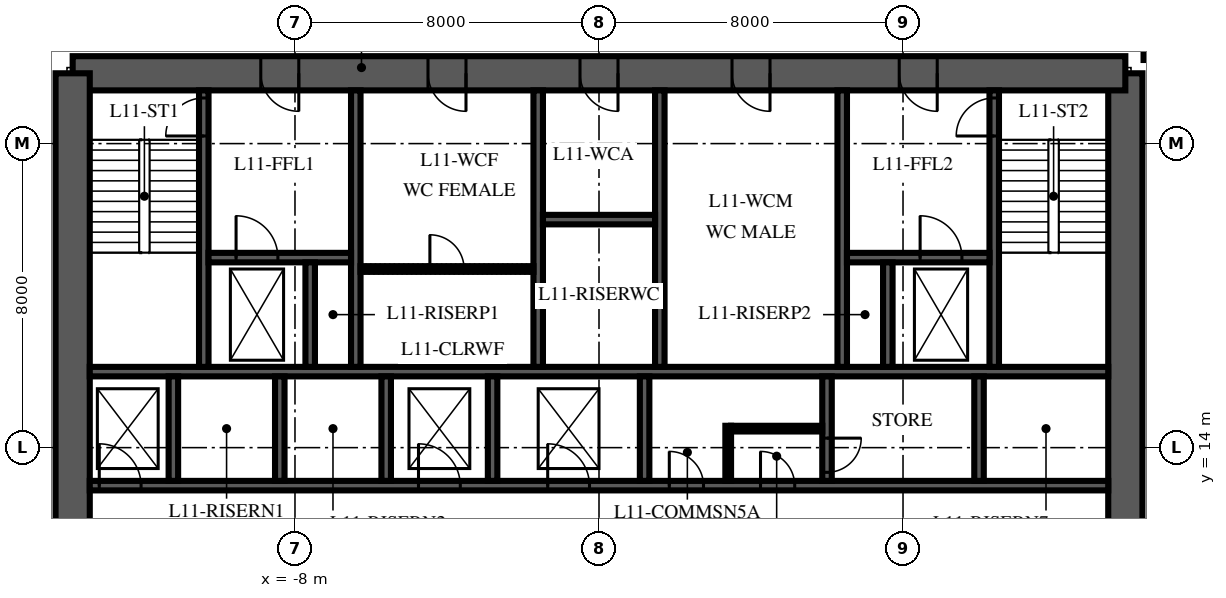
"""IFC4 building model, lengths in metres.
Left out: names, types, materials, properties, quantities, classifications, styles, units other than length and angle.
Written with IfcOpenShell. Run it as: python <this file> out.ifc"""

import sys

from ifc_helpers import new_model, si_unit, direction, frame, frame_2d, origin, place, context, subcontext, project, spatial, polyline, rectangle, outline, extrude, element, fill, save


model = new_model("IFC4")
c1 = context("Model", 3, precision=1e-05, world=origin(), true_north=direction((0.0, 1.0)))
c2 = subcontext(c1, "Body", "Model", "MODEL_VIEW")
j1 = project(units=[si_unit("LENGTHUNIT", "METRE"), si_unit("PLANEANGLEUNIT", "RADIAN")], contexts=[c1])
p1 = place(None, origin())
s1 = spatial("IfcSite", under=j1, at=p1, CompositionType="ELEMENT")
p2 = place(p1, origin())
s2 = spatial("IfcBuilding", under=s1, at=p2, CompositionType="ELEMENT")
p3 = place(p2, frame((0.0, 0.0, 56.0)))
s3 = spatial("IfcBuildingStorey", under=s2, at=p3, CompositionType="ELEMENT", Elevation=56.0)
p4 = place(p3, frame((13.85, 6.15, 0.0), z_axis=(0.0, 0.0, 1.0), x_axis=(0.0, 1.0, 0.0)))
e1 = element("IfcWall", 1, at=p4, inside=s3, PredefinedType="SHEAR", context=c2, shape_type="SweptSolid", body=[
    extrude(outline(polyline([(0.0, -0.45), (17.7, -0.45), (17.7, 0.0), (17.25, 0.0), (17.25, 0.45), (0.45, 0.45), (0.45, 0.0), (0.0, 0.0), (0.0, -0.45)])), origin(), (0.0, 0.0, 1.0), 4.0),
])
p5 = place(p4, frame((4.15, 0.0, 0.0)))
e2 = element("IfcOpeningElement", 2, at=p5, cuts=e1, PredefinedType="OPENING", context=c2, shape_type="SweptSolid", body=[
    extrude(rectangle(XDim=1.8, YDim=2.4, at=frame_2d((0.9, 1.2))), frame((0.0, 0.465, 0.0), z_axis=(0.0, -1.0, 0.0), x_axis=(1.0, 0.0, 0.0)), (0.0, 0.0, 1.0), 0.93),
])
p6 = place(p3, frame((13.85, 23.85, 0.0), z_axis=(0.0, 0.0, 1.0), x_axis=(-1.0, 0.0, 0.0)))
e3 = element("IfcWall", 3, at=p6, inside=s3, PredefinedType="SHEAR", context=c2, shape_type="SweptSolid", body=[
    extrude(rectangle(XDim=27.7, YDim=0.9, at=frame_2d((13.85, 0.0))), origin(), (0.0, 0.0, 1.0), 4.0),
])
p7 = place(p6, frame((21.75, 0.0, 0.0)))
e4 = element("IfcOpeningElement", 4, at=p7, cuts=e3, PredefinedType="OPENING", context=c2, shape_type="SweptSolid", body=[
    extrude(rectangle(XDim=1.0, YDim=2.1, at=frame_2d((0.5, 1.05))), frame((0.0, 0.465, 0.0), z_axis=(0.0, -1.0, 0.0), x_axis=(1.0, 0.0, 0.0)), (0.0, 0.0, 1.0), 0.93),
])
p8 = place(p6, frame((4.95, 0.0, 0.0)))
e5 = element("IfcOpeningElement", 5, at=p8, cuts=e3, PredefinedType="OPENING", context=c2, shape_type="SweptSolid", body=[
    extrude(rectangle(XDim=1.0, YDim=2.1, at=frame_2d((0.5, 1.05))), frame((0.0, 0.465, 0.0), z_axis=(0.0, -1.0, 0.0), x_axis=(1.0, 0.0, 0.0)), (0.0, 0.0, 1.0), 0.93),
])
p9 = place(p6, frame((17.35, 0.0, 0.0)))
e6 = element("IfcOpeningElement", 6, at=p9, cuts=e3, PredefinedType="OPENING", context=c2, shape_type="SweptSolid", body=[
    extrude(rectangle(XDim=1.0, YDim=2.1, at=frame_2d((0.5, 1.05))), frame((0.0, 0.465, 0.0), z_axis=(0.0, -1.0, 0.0), x_axis=(1.0, 0.0, 0.0)), (0.0, 0.0, 1.0), 0.93),
])
p10 = place(p6, frame((13.35, 0.0, 0.0)))
e7 = element("IfcOpeningElement", 7, at=p10, cuts=e3, PredefinedType="OPENING", context=c2, shape_type="SweptSolid", body=[
    extrude(rectangle(XDim=1.0, YDim=2.1, at=frame_2d((0.5, 1.05))), frame((0.0, 0.465, 0.0), z_axis=(0.0, -1.0, 0.0), x_axis=(1.0, 0.0, 0.0)), (0.0, 0.0, 1.0), 0.93),
])
p11 = place(p6, frame((9.35, 0.0, 0.0)))
e8 = element("IfcOpeningElement", 8, at=p11, cuts=e3, PredefinedType="OPENING", context=c2, shape_type="SweptSolid", body=[
    extrude(rectangle(XDim=1.0, YDim=2.1, at=frame_2d((0.5, 1.05))), frame((0.0, 0.465, 0.0), z_axis=(0.0, -1.0, 0.0), x_axis=(1.0, 0.0, 0.0)), (0.0, 0.0, 1.0), 0.93),
])
p12 = place(p3, frame((-13.85, 23.85, 0.0), z_axis=(0.0, 0.0, 1.0), x_axis=(0.0, -1.0, 0.0)))
e9 = element("IfcWall", 9, at=p12, inside=s3, PredefinedType="SHEAR", context=c2, shape_type="SweptSolid", body=[
    extrude(outline(polyline([(0.0, -0.45), (17.7, -0.45), (17.7, 0.0), (17.25, 0.0), (17.25, 0.45), (0.45, 0.45), (0.45, 0.0), (0.0, 0.0), (0.0, -0.45)])), origin(), (0.0, 0.0, 1.0), 4.0),
])
p13 = place(p12, frame((11.75, 0.0, 0.0)))
e10 = element("IfcOpeningElement", 10, at=p13, cuts=e9, PredefinedType="OPENING", context=c2, shape_type="SweptSolid", body=[
    extrude(rectangle(XDim=1.8, YDim=2.4, at=frame_2d((0.9, 1.2))), frame((0.0, 0.465, 0.0), z_axis=(0.0, -1.0, 0.0), x_axis=(1.0, 0.0, 0.0)), (0.0, 0.0, 1.0), 0.93),
])
p14 = place(p3, frame((-13.4, 13.0, 0.0), z_axis=(0.0, 0.0, 1.0), x_axis=(1.0, 0.0, 0.0)))
e11 = element("IfcWall", 11, at=p14, inside=s3, PredefinedType="SHEAR", context=c2, shape_type="SweptSolid", body=[
    extrude(rectangle(XDim=26.8, YDim=0.25, at=frame_2d((13.4, 0.0))), origin(), (0.0, 0.0, 1.0), 4.0),
])
p15 = place(p14, frame((0.25, 0.0, 0.0)))
e12 = element("IfcOpeningElement", 12, at=p15, cuts=e11, PredefinedType="OPENING", context=c2, shape_type="SweptSolid", body=[
    extrude(rectangle(XDim=1.1, YDim=2.1, at=frame_2d((0.55, 1.05))), frame((0.0, 0.14, 0.0), z_axis=(0.0, -1.0, 0.0), x_axis=(1.0, 0.0, 0.0)), (0.0, 0.0, 1.0), 0.28),
])
p16 = place(p14, frame((8.65, 0.0, 0.0)))
e13 = element("IfcOpeningElement", 13, at=p16, cuts=e11, PredefinedType="OPENING", context=c2, shape_type="SweptSolid", body=[
    extrude(rectangle(XDim=1.1, YDim=2.1, at=frame_2d((0.55, 1.05))), frame((0.0, 0.14, 0.0), z_axis=(0.0, -1.0, 0.0), x_axis=(1.0, 0.0, 0.0)), (0.0, 0.0, 1.0), 0.28),
])
p17 = place(p14, frame((12.05, 0.0, 0.0)))
e14 = element("IfcOpeningElement", 14, at=p17, cuts=e11, PredefinedType="OPENING", context=c2, shape_type="SweptSolid", body=[
    extrude(rectangle(XDim=1.1, YDim=2.1, at=frame_2d((0.55, 1.05))), frame((0.0, 0.14, 0.0), z_axis=(0.0, -1.0, 0.0), x_axis=(1.0, 0.0, 0.0)), (0.0, 0.0, 1.0), 0.28),
])
p18 = place(p14, frame((15.25, 0.0, 0.0)))
e15 = element("IfcOpeningElement", 15, at=p18, cuts=e11, PredefinedType="OPENING", context=c2, shape_type="SweptSolid", body=[
    extrude(rectangle(XDim=0.9, YDim=2.1, at=frame_2d((0.45, 1.05))), frame((0.0, 0.14, 0.0), z_axis=(0.0, -1.0, 0.0), x_axis=(1.0, 0.0, 0.0)), (0.0, 0.0, 1.0), 0.28),
])
p19 = place(p14, frame((17.65, 0.0, 0.0)))
e16 = element("IfcOpeningElement", 16, at=p19, cuts=e11, PredefinedType="OPENING", context=c2, shape_type="SweptSolid", body=[
    extrude(rectangle(XDim=0.9, YDim=2.1, at=frame_2d((0.45, 1.05))), frame((0.0, 0.14, 0.0), z_axis=(0.0, -1.0, 0.0), x_axis=(1.0, 0.0, 0.0)), (0.0, 0.0, 1.0), 0.28),
])
p20 = place(p3, frame((-13.4, 16.0, 0.0), z_axis=(0.0, 0.0, 1.0), x_axis=(1.0, 0.0, 0.0)))
e17 = element("IfcWall", 17, at=p20, inside=s3, PredefinedType="SHEAR", context=c2, shape_type="SweptSolid", body=[
    extrude(rectangle(XDim=26.8, YDim=0.25, at=frame_2d((13.4, 0.0))), origin(), (0.0, 0.0, 1.0), 4.0),
])
for number, where, z_axis, x_axis in (
    (18, (-11.2, 13.125, 0.0), (0.0, 0.0, 1.0), (0.0, 1.0, 0.0)),
    (19, (-8.4, 13.125, 0.0), (0.0, 0.0, 1.0), (0.0, 1.0, 0.0)),
    (20, (-5.6, 13.125, 0.0), (0.0, 0.0, 1.0), (0.0, 1.0, 0.0)),
    (21, (-2.8, 13.125, 0.0), (0.0, 0.0, 1.0), (0.0, 1.0, 0.0)),
    (22, (1.2, 13.125, 0.0), (0.0, 0.0, 1.0), (0.0, 1.0, 0.0)),
):
    element("IfcWall", number, at=place(p3, frame(where, z_axis=z_axis, x_axis=x_axis)), inside=s3, PredefinedType="SHEAR", context=c2, shape_type="SweptSolid", body=[
        extrude(rectangle(XDim=2.75, YDim=0.25, at=frame_2d((1.375, 0.0))), origin(), (0.0, 0.0, 1.0), 4.0),
    ])
p21 = place(p3, frame((6.0, 13.125, 0.0), z_axis=(0.0, 0.0, 1.0), x_axis=(0.0, 1.0, 0.0)))
e23 = element("IfcWall", 23, at=p21, inside=s3, PredefinedType="SHEAR", context=c2, shape_type="SweptSolid", body=[
    extrude(rectangle(XDim=2.75, YDim=0.25, at=frame_2d((1.375, 0.0))), origin(), (0.0, 0.0, 1.0), 4.0),
])
p22 = place(p21, frame((0.225, 0.0, 0.0)))
e24 = element("IfcOpeningElement", 24, at=p22, cuts=e23, PredefinedType="OPENING", context=c2, shape_type="SweptSolid", body=[
    extrude(rectangle(XDim=0.9, YDim=2.1, at=frame_2d((0.45, 1.05))), frame((0.0, 0.14, 0.0), z_axis=(0.0, -1.0, 0.0), x_axis=(1.0, 0.0, 0.0)), (0.0, 0.0, 1.0), 0.28),
])
p23 = place(p3, frame((10.0, 13.125, 0.0), z_axis=(0.0, 0.0, 1.0), x_axis=(0.0, 1.0, 0.0)))
e25 = element("IfcWall", 25, at=p23, inside=s3, PredefinedType="SHEAR", context=c2, shape_type="SweptSolid", body=[
    extrude(rectangle(XDim=2.75, YDim=0.25, at=frame_2d((1.375, 0.0))), origin(), (0.0, 0.0, 1.0), 4.0),
])
p24 = place(p3, frame((-10.4, 16.125, 0.0), z_axis=(0.0, 0.0, 1.0), x_axis=(0.0, 1.0, 0.0)))
e26 = element("IfcWall", 26, at=p24, inside=s3, PredefinedType="SHEAR", context=c2, shape_type="SweptSolid", body=[
    extrude(rectangle(XDim=7.275, YDim=0.25, at=frame_2d((3.637, 0.0))), origin(), (0.0, 0.0, 1.0), 4.0),
])
p25 = place(p24, frame((6.075, 0.0, 0.0)))
e27 = element("IfcOpeningElement", 27, at=p25, cuts=e26, PredefinedType="OPENING", context=c2, shape_type="SweptSolid", body=[
    extrude(rectangle(XDim=1.0, YDim=2.1, at=frame_2d((0.5, 1.05))), frame((0.0, 0.14, 0.0), z_axis=(0.0, -1.0, 0.0), x_axis=(1.0, 0.0, 0.0)), (0.0, 0.0, 1.0), 0.28),
])
for number, where, z_axis, x_axis in (
    (28, (-6.4, 16.125, 0.0), (0.0, 0.0, 1.0), (0.0, 1.0, 0.0)),
    (29, (-1.6, 16.125, 0.0), (0.0, 0.0, 1.0), (0.0, 1.0, 0.0)),
    (30, (1.6, 16.125, 0.0), (0.0, 0.0, 1.0), (0.0, 1.0, 0.0)),
    (31, (6.4, 16.125, 0.0), (0.0, 0.0, 1.0), (0.0, 1.0, 0.0)),
):
    element("IfcWall", number, at=place(p3, frame(where, z_axis=z_axis, x_axis=x_axis)), inside=s3, PredefinedType="SHEAR", context=c2, shape_type="SweptSolid", body=[
        extrude(rectangle(XDim=7.275, YDim=0.25, at=frame_2d((3.637, 0.0))), origin(), (0.0, 0.0, 1.0), 4.0),
    ])
p26 = place(p3, frame((10.4, 16.125, 0.0), z_axis=(0.0, 0.0, 1.0), x_axis=(0.0, 1.0, 0.0)))
e32 = element("IfcWall", 32, at=p26, inside=s3, PredefinedType="SHEAR", context=c2, shape_type="SweptSolid", body=[
    extrude(rectangle(XDim=7.275, YDim=0.25, at=frame_2d((3.637, 0.0))), origin(), (0.0, 0.0, 1.0), 4.0),
])
p27 = place(p26, frame((6.075, 0.0, 0.0)))
e33 = element("IfcOpeningElement", 33, at=p27, cuts=e32, PredefinedType="OPENING", context=c2, shape_type="SweptSolid", body=[
    extrude(rectangle(XDim=1.0, YDim=2.1, at=frame_2d((0.5, 1.05))), frame((0.0, 0.14, 0.0), z_axis=(0.0, -1.0, 0.0), x_axis=(1.0, 0.0, 0.0)), (0.0, 0.0, 1.0), 0.28),
])
p28 = place(p3, frame((-10.275, 19.0, 0.0), z_axis=(0.0, 0.0, 1.0), x_axis=(1.0, 0.0, 0.0)))
e34 = element("IfcWall", 34, at=p28, inside=s3, PredefinedType="SHEAR", context=c2, shape_type="SweptSolid", body=[
    extrude(rectangle(XDim=3.75, YDim=0.25, at=frame_2d((1.875, 0.0))), origin(), (0.0, 0.0, 1.0), 4.0),
])
p29 = place(p28, frame((0.725, 0.0, 0.0)))
e35 = element("IfcOpeningElement", 35, at=p29, cuts=e34, PredefinedType="OPENING", context=c2, shape_type="SweptSolid", body=[
    extrude(rectangle(XDim=1.1, YDim=2.1, at=frame_2d((0.55, 1.05))), frame((0.0, 0.14, 0.0), z_axis=(0.0, -1.0, 0.0), x_axis=(1.0, 0.0, 0.0)), (0.0, 0.0, 1.0), 0.28),
])
p30 = place(p3, frame((6.525, 19.0, 0.0), z_axis=(0.0, 0.0, 1.0), x_axis=(1.0, 0.0, 0.0)))
e36 = element("IfcWall", 36, at=p30, inside=s3, PredefinedType="SHEAR", context=c2, shape_type="SweptSolid", body=[
    extrude(rectangle(XDim=3.75, YDim=0.25, at=frame_2d((1.875, 0.0))), origin(), (0.0, 0.0, 1.0), 4.0),
])
p31 = place(p30, frame((1.925, 0.0, 0.0)))
e37 = element("IfcOpeningElement", 37, at=p31, cuts=e36, PredefinedType="OPENING", context=c2, shape_type="SweptSolid", body=[
    extrude(rectangle(XDim=1.1, YDim=2.1, at=frame_2d((0.55, 1.05))), frame((0.0, 0.14, 0.0), z_axis=(0.0, -1.0, 0.0), x_axis=(1.0, 0.0, 0.0)), (0.0, 0.0, 1.0), 0.28),
])
for number, where, z_axis, x_axis in (
    (38, (-7.6, 16.125, 0.0), (0.0, 0.0, 1.0), (0.0, 1.0, 0.0)),
    (39, (7.6, 16.125, 0.0), (0.0, 0.0, 1.0), (0.0, 1.0, 0.0)),
):
    element("IfcWall", number, at=place(p3, frame(where, z_axis=z_axis, x_axis=x_axis)), inside=s3, PredefinedType="SHEAR", context=c2, shape_type="SweptSolid", body=[
        extrude(rectangle(XDim=2.75, YDim=0.25, at=frame_2d((1.375, 0.0))), origin(), (0.0, 0.0, 1.0), 4.0),
    ])
p32 = place(p3, frame((-1.475, 20.0, 0.0), z_axis=(0.0, 0.0, 1.0), x_axis=(1.0, 0.0, 0.0)))
e40 = element("IfcWall", 40, at=p32, inside=s3, PredefinedType="SHEAR", context=c2, shape_type="SweptSolid", body=[
    extrude(rectangle(XDim=2.95, YDim=0.25, at=frame_2d((1.475, 0.0))), origin(), (0.0, 0.0, 1.0), 4.0),
])
p33 = place(p3, frame((-6.275, 18.7, 0.0), z_axis=(0.0, 0.0, 1.0), x_axis=(1.0, 0.0, 0.0)))
e41 = element("IfcWall", 41, at=p33, inside=s3, PredefinedType="PARTITIONING", context=c2, shape_type="SweptSolid", body=[
    extrude(rectangle(XDim=4.55, YDim=0.15, at=frame_2d((2.275, 0.0))), origin(), (0.0, 0.0, 1.0), 3.85),
])
p34 = place(p33, frame((1.825, 0.0, 0.0)))
e42 = element("IfcOpeningElement", 42, at=p34, cuts=e41, PredefinedType="OPENING", context=c2, shape_type="SweptSolid", body=[
    extrude(rectangle(XDim=0.9, YDim=2.1, at=frame_2d((0.45, 1.05))), frame((0.0, 0.09, 0.0), z_axis=(0.0, -1.0, 0.0), x_axis=(1.0, 0.0, 0.0)), (0.0, 0.0, 1.0), 0.18),
])
p35 = place(p3, frame((3.4, 13.125, 0.0), z_axis=(0.0, 0.0, 1.0), x_axis=(0.0, 1.0, 0.0)))
e43 = element("IfcWall", 43, at=p35, inside=s3, PredefinedType="PARTITIONING", context=c2, shape_type="SweptSolid", body=[
    extrude(rectangle(XDim=1.45, YDim=0.15, at=frame_2d((0.725, 0.0))), origin(), (0.0, 0.0, 1.0), 3.85),
])
p36 = place(p3, frame((3.475, 14.5, 0.0), z_axis=(0.0, 0.0, 1.0), x_axis=(1.0, 0.0, 0.0)))
e44 = element("IfcWall", 44, at=p36, inside=s3, PredefinedType="PARTITIONING", context=c2, shape_type="SweptSolid", body=[
    extrude(rectangle(XDim=2.4, YDim=0.15, at=frame_2d((1.2, 0.0))), origin(), (0.0, 0.0, 1.0), 3.85),
])
p37 = place(p3, frame((14.33, 24.3, 0.0), z_axis=(0.0, 0.0, 1.0), x_axis=(1.0, 0.0, 0.0)))
e45 = element("IfcWall", 45, at=p37, inside=s3, PredefinedType="PARTITIONING", context=c2, shape_type="SweptSolid", body=[
    extrude(rectangle(XDim=1.82, YDim=0.2, at=frame_2d((0.91, 0.0))), origin(), (0.0, 0.0, 1.0), 3.4),
])
p38 = place(p7, origin())
e46 = element("IfcDoor", 46, at=p38, inside=s3, OperationType="SINGLE_SWING_RIGHT", PredefinedType="DOOR", context=c2, shape_type="SweptSolid", body=[
    extrude(rectangle(XDim=1.0, YDim=2.1, at=frame_2d((0.5, 1.05))), frame((0.0, 0.45, 0.0), z_axis=(0.0, -1.0, 0.0), x_axis=(1.0, 0.0, 0.0)), (0.0, 0.0, 1.0), 0.899),
])
fill(e4, e46)
p39 = place(p8, origin())
e47 = element("IfcDoor", 47, at=p39, inside=s3, OperationType="SINGLE_SWING_RIGHT", PredefinedType="DOOR", context=c2, shape_type="SweptSolid", body=[
    extrude(rectangle(XDim=1.0, YDim=2.1, at=frame_2d((0.5, 1.05))), frame((0.0, 0.45, 0.0), z_axis=(0.0, -1.0, 0.0), x_axis=(1.0, 0.0, 0.0)), (0.0, 0.0, 1.0), 0.899),
])
fill(e5, e47)
p40 = place(p9, origin())
e48 = element("IfcDoor", 48, at=p40, inside=s3, OperationType="SINGLE_SWING_LEFT", PredefinedType="DOOR", context=c2, shape_type="SweptSolid", body=[
    extrude(rectangle(XDim=1.0, YDim=2.1, at=frame_2d((0.5, 1.05))), frame((0.0, 0.45, 0.0), z_axis=(0.0, -1.0, 0.0), x_axis=(1.0, 0.0, 0.0)), (0.0, 0.0, 1.0), 0.899),
])
fill(e6, e48)
p41 = place(p10, origin())
e49 = element("IfcDoor", 49, at=p41, inside=s3, OperationType="SINGLE_SWING_LEFT", PredefinedType="DOOR", context=c2, shape_type="SweptSolid", body=[
    extrude(rectangle(XDim=1.0, YDim=2.1, at=frame_2d((0.5, 1.05))), frame((0.0, 0.45, 0.0), z_axis=(0.0, -1.0, 0.0), x_axis=(1.0, 0.0, 0.0)), (0.0, 0.0, 1.0), 0.899),
])
fill(e7, e49)
p42 = place(p11, origin())
e50 = element("IfcDoor", 50, at=p42, inside=s3, OperationType="SINGLE_SWING_LEFT", PredefinedType="DOOR", context=c2, shape_type="SweptSolid", body=[
    extrude(rectangle(XDim=1.0, YDim=2.1, at=frame_2d((0.5, 1.05))), frame((0.0, 0.45, 0.0), z_axis=(0.0, -1.0, 0.0), x_axis=(1.0, 0.0, 0.0)), (0.0, 0.0, 1.0), 0.899),
])
fill(e8, e50)
p43 = place(p25, origin())
e51 = element("IfcDoor", 51, at=p43, inside=s3, OperationType="SINGLE_SWING_LEFT", PredefinedType="DOOR", context=c2, shape_type="SweptSolid", body=[
    extrude(rectangle(XDim=1.0, YDim=2.1, at=frame_2d((0.5, 1.05))), frame((0.0, 0.125, 0.0), z_axis=(0.0, -1.0, 0.0), x_axis=(1.0, 0.0, 0.0)), (0.0, 0.0, 1.0), 0.25),
])
fill(e27, e51)
p44 = place(p27, origin())
e52 = element("IfcDoor", 52, at=p44, inside=s3, OperationType="SINGLE_SWING_LEFT", PredefinedType="DOOR", context=c2, shape_type="SweptSolid", body=[
    extrude(rectangle(XDim=1.0, YDim=2.1, at=frame_2d((0.5, 1.05))), frame((0.0, 0.125, 0.0), z_axis=(0.0, -1.0, 0.0), x_axis=(1.0, 0.0, 0.0)), (0.0, 0.0, 1.0), 0.25),
])
fill(e33, e52)
p45 = place(p15, origin())
e53 = element("IfcDoor", 53, at=p45, inside=s3, OperationType="SLIDING_TO_LEFT", PredefinedType="DOOR", context=c2, shape_type="SweptSolid", body=[
    extrude(rectangle(XDim=1.1, YDim=2.1, at=frame_2d((0.55, 1.05))), frame((0.0, 0.125, 0.0), z_axis=(0.0, -1.0, 0.0), x_axis=(1.0, 0.0, 0.0)), (0.0, 0.0, 1.0), 0.25),
])
fill(e12, e53)
p46 = place(p16, origin())
e54 = element("IfcDoor", 54, at=p46, inside=s3, OperationType="SLIDING_TO_LEFT", PredefinedType="DOOR", context=c2, shape_type="SweptSolid", body=[
    extrude(rectangle(XDim=1.1, YDim=2.1, at=frame_2d((0.55, 1.05))), frame((0.0, 0.125, 0.0), z_axis=(0.0, -1.0, 0.0), x_axis=(1.0, 0.0, 0.0)), (0.0, 0.0, 1.0), 0.25),
])
fill(e13, e54)
p47 = place(p17, origin())
e55 = element("IfcDoor", 55, at=p47, inside=s3, OperationType="SLIDING_TO_LEFT", PredefinedType="DOOR", context=c2, shape_type="SweptSolid", body=[
    extrude(rectangle(XDim=1.1, YDim=2.1, at=frame_2d((0.55, 1.05))), frame((0.0, 0.125, 0.0), z_axis=(0.0, -1.0, 0.0), x_axis=(1.0, 0.0, 0.0)), (0.0, 0.0, 1.0), 0.25),
])
fill(e14, e55)
p48 = place(p31, origin())
e56 = element("IfcDoor", 56, at=p48, inside=s3, OperationType="SLIDING_TO_RIGHT", PredefinedType="DOOR", context=c2, shape_type="SweptSolid", body=[
    extrude(rectangle(XDim=1.1, YDim=2.1, at=frame_2d((0.55, 1.05))), frame((0.0, 0.125, 0.0), z_axis=(0.0, -1.0, 0.0), x_axis=(1.0, 0.0, 0.0)), (0.0, 0.0, 1.0), 0.25),
])
fill(e37, e56)
p49 = place(p29, origin())
e57 = element("IfcDoor", 57, at=p49, inside=s3, OperationType="SLIDING_TO_RIGHT", PredefinedType="DOOR", context=c2, shape_type="SweptSolid", body=[
    extrude(rectangle(XDim=1.1, YDim=2.1, at=frame_2d((0.55, 1.05))), frame((0.0, 0.125, 0.0), z_axis=(0.0, -1.0, 0.0), x_axis=(1.0, 0.0, 0.0)), (0.0, 0.0, 1.0), 0.25),
])
fill(e35, e57)
p50 = place(p18, origin())
e58 = element("IfcDoor", 58, at=p50, inside=s3, OperationType="SINGLE_SWING_LEFT", PredefinedType="DOOR", context=c2, shape_type="SweptSolid", body=[
    extrude(rectangle(XDim=0.9, YDim=2.1, at=frame_2d((0.45, 1.05))), frame((0.0, 0.125, 0.0), z_axis=(0.0, -1.0, 0.0), x_axis=(1.0, 0.0, 0.0)), (0.0, 0.0, 1.0), 0.25),
])
fill(e15, e58)
p51 = place(p19, origin())
e59 = element("IfcDoor", 59, at=p51, inside=s3, OperationType="SINGLE_SWING_LEFT", PredefinedType="DOOR", context=c2, shape_type="SweptSolid", body=[
    extrude(rectangle(XDim=0.9, YDim=2.1, at=frame_2d((0.45, 1.05))), frame((0.0, 0.125, 0.0), z_axis=(0.0, -1.0, 0.0), x_axis=(1.0, 0.0, 0.0)), (0.0, 0.0, 1.0), 0.25),
])
fill(e16, e59)
p52 = place(p22, frame((0.9, 0.0, 0.0), z_axis=(0.0, 0.0, 1.0), x_axis=(-1.0, 0.0, 0.0)))
e60 = element("IfcDoor", 60, at=p52, inside=s3, OperationType="SINGLE_SWING_LEFT", PredefinedType="DOOR", context=c2, shape_type="SweptSolid", body=[
    extrude(rectangle(XDim=0.9, YDim=2.1, at=frame_2d((0.45, 1.05))), frame((0.0, 0.125, 0.0), z_axis=(0.0, -1.0, 0.0), x_axis=(1.0, 0.0, 0.0)), (0.0, 0.0, 1.0), 0.25),
])
fill(e24, e60)
p53 = place(p34, origin())
e61 = element("IfcDoor", 61, at=p53, inside=s3, OperationType="SINGLE_SWING_LEFT", PredefinedType="DOOR", context=c2, shape_type="SweptSolid", body=[
    extrude(rectangle(XDim=0.9, YDim=2.1, at=frame_2d((0.45, 1.05))), frame((0.0, 0.075, 0.0), z_axis=(0.0, -1.0, 0.0), x_axis=(1.0, 0.0, 0.0)), (0.0, 0.0, 1.0), 0.149),
])
fill(e42, e61)
save(model, sys.argv[1])
